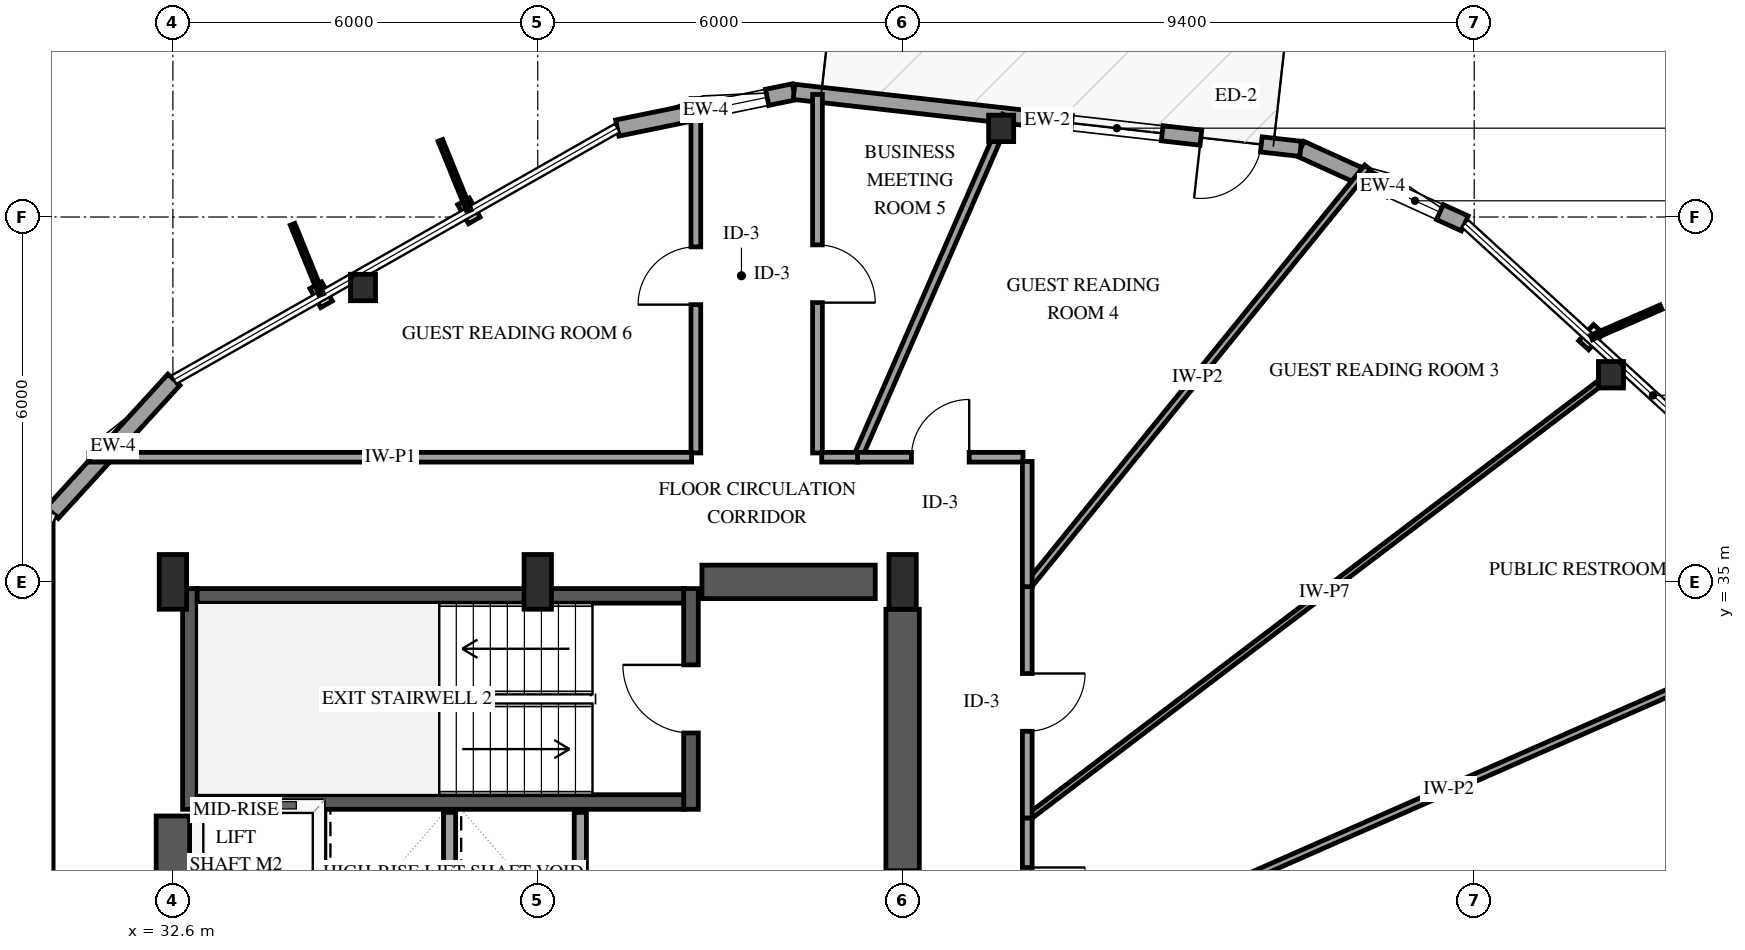
"""IFC4 building model, lengths in metres.
Left out: names, types, materials, properties, quantities, classifications, styles, units other than length and angle.
Written with IfcOpenShell. Run it as: python <this file> out.ifc"""

import sys

from ifc_helpers import new_model, si_unit, direction, frame, frame_2d, origin, origin_2d, place, context, subcontext, project, spatial, rectangle, i_section, extrude, element, fill, save


model = new_model("IFC4")
c1 = context("Model", 3, precision=1e-05, world=origin(), true_north=direction((0.0, 1.0)))
c2 = subcontext(c1, "Body", "Model", "MODEL_VIEW")
j1 = project(units=[si_unit("LENGTHUNIT", "METRE"), si_unit("PLANEANGLEUNIT", "RADIAN")], contexts=[c1])
p1 = place(None, origin())
s1 = spatial("IfcSite", under=j1, at=p1, CompositionType="ELEMENT")
p2 = place(p1, origin())
s2 = spatial("IfcBuilding", under=s1, at=p2, CompositionType="ELEMENT")
p3 = place(p2, frame((0.0, 0.0, 142.6)))
s3 = spatial("IfcBuildingStorey", under=s2, at=p3, CompositionType="ELEMENT", Elevation=142.6)
p4 = place(p3, frame((32.88, 31.26, 0.0), z_axis=(0.0, 0.0, 1.0), x_axis=(0.0, 1.0, 0.0)))
e1 = element("IfcWall", 1, at=p4, inside=s3, PredefinedType="SHEAR", context=c2, shape_type="SweptSolid", body=[
    extrude(rectangle(XDim=3.63, YDim=0.24, at=frame_2d((1.815, 0.0))), origin(), (0.0, 0.0, 1.0), 3.6),
])
p5 = place(p3, frame((41.12, 31.26, 0.0), z_axis=(0.0, 0.0, 1.0), x_axis=(0.0, 1.0, 0.0)))
e2 = element("IfcWall", 2, at=p5, inside=s3, PredefinedType="SHEAR", context=c2, shape_type="SweptSolid", body=[
    extrude(rectangle(XDim=3.63, YDim=0.24, at=frame_2d((1.815, 0.0))), origin(), (0.0, 0.0, 1.0), 3.6),
])
p6 = place(p5, frame((1.255, 0.0, 0.0)))
e3 = element("IfcOpeningElement", 3, at=p6, cuts=e2, PredefinedType="OPENING", context=c2, shape_type="SweptSolid", body=[
    extrude(rectangle(XDim=1.12, YDim=2.15, at=frame_2d((0.56, 1.075))), frame((0.0, 0.13, 0.0), z_axis=(0.0, -1.0, 0.0), x_axis=(1.0, 0.0, 0.0)), (0.0, 0.0, 1.0), 0.26),
])
for number, where, z_axis, x_axis in (
    (4, (33.0, 31.38, 0.0), (0.0, 0.0, 1.0), (1.0, 0.0, 0.0)),
    (5, (33.0, 34.77, 0.0), (0.0, 0.0, 1.0), (1.0, 0.0, 0.0)),
):
    element("IfcWall", number, at=place(p3, frame(where, z_axis=z_axis, x_axis=x_axis)), inside=s3, PredefinedType="SHEAR", context=c2, shape_type="SweptSolid", body=[
        extrude(rectangle(XDim=8.0, YDim=0.24, at=frame_2d((4.0, 0.0))), origin(), (0.0, 0.0, 1.0), 3.6),
    ])
p7 = place(p3, frame((32.6, 18.85, 0.0), z_axis=(0.0, 0.0, 1.0), x_axis=(0.0, 1.0, 0.0)))
e6 = element("IfcWall", 6, at=p7, inside=s3, PredefinedType="SHEAR", context=c2, shape_type="SweptSolid", body=[
    extrude(rectangle(XDim=12.3, YDim=0.55, at=frame_2d((6.15, 0.0))), origin(), (0.0, 0.0, 1.0), 3.6),
])
p8 = place(p3, frame((41.3, 35.0, 0.0), z_axis=(0.0, 0.0, 1.0), x_axis=(1.0, 0.0, 0.0)))
e7 = element("IfcWall", 7, at=p8, inside=s3, PredefinedType="SHEAR", context=c2, shape_type="SweptSolid", body=[
    extrude(rectangle(XDim=2.85, YDim=0.55, at=frame_2d((1.425, 0.0))), origin(), (0.0, 0.0, 1.0), 3.6),
])
p9 = place(p3, frame((44.6, 29.8, 0.0), z_axis=(0.0, 0.0, 1.0), x_axis=(0.0, 1.0, 0.0)))
e8 = element("IfcWall", 8, at=p9, inside=s3, PredefinedType="SHEAR", context=c2, shape_type="SweptSolid", body=[
    extrude(rectangle(XDim=4.75, YDim=0.55, at=frame_2d((2.375, 0.0))), origin(), (0.0, 0.0, 1.0), 3.6),
])
for number, where, z_axis, x_axis in (
    (9, (32.6, 35.0, 0.0), (0.0, 0.0, 1.0), (1.0, 0.0, 0.0)),
    (10, (38.6, 35.0, 0.0), (0.0, 0.0, 1.0), (1.0, 0.0, 0.0)),
    (11, (44.6, 35.0, 0.0), (0.0, 0.0, 1.0), (1.0, 0.0, 0.0)),
):
    element("IfcColumn", number, at=place(p3, frame(where, z_axis=z_axis, x_axis=x_axis)), inside=s3, PredefinedType="PILASTER", context=c2, shape_type="SweptSolid", body=[
        extrude(rectangle(XDim=0.45, YDim=0.9, at=origin_2d()), origin(), (0.0, 0.0, 1.0), 3.6),
    ])
for number, where, z_axis, x_axis in (
    (12, (56.249, 38.406, 0.0), (0.0, 0.0, 1.0), (1.0, 0.0, 0.0)),
    (13, (46.221, 42.458, 0.0), (0.0, 0.0, 1.0), (1.0, 0.0, 0.0)),
    (14, (35.726, 39.841, 0.0), (0.0, 0.0, 1.0), (1.0, 0.0, 0.0)),
):
    element("IfcColumn", number, at=place(p3, frame(where, z_axis=z_axis, x_axis=x_axis)), inside=s3, PredefinedType="COLUMN", context=c2, shape_type="SweptSolid", body=[
        extrude(i_section(OverallWidth=0.412, OverallDepth=0.435, WebThickness=0.036, FlangeThickness=0.057, FilletRadius=0.038, at=origin_2d()), origin(), (0.0, 0.0, 1.0), 3.6),
    ])
p10 = place(p3, frame((53.846, 40.895, 0.0), z_axis=(0.0, 0.0, 1.0), x_axis=(-0.910510169674, 0.413486675625, 0.0)))
e15 = element("IfcWall", 15, at=p10, inside=s3, PredefinedType="SOLIDWALL", context=c2, shape_type="SweptSolid", body=[
    extrude(rectangle(XDim=2.966, YDim=0.27, at=frame_2d((1.483, 0.0))), origin(), (0.0, 0.0, 1.0), 2.679),
])
p11 = place(p10, frame((0.45, 0.0, 0.75)))
e16 = element("IfcOpeningElement", 16, at=p11, cuts=e15, PredefinedType="OPENING", context=c2, shape_type="SweptSolid", body=[
    extrude(rectangle(XDim=0.9, YDim=1.5, at=frame_2d((0.45, 0.75))), frame((0.0, 0.145, 0.0), z_axis=(0.0, -1.0, 0.0), x_axis=(1.0, 0.0, 0.0)), (0.0, 0.0, 1.0), 0.29),
])
p12 = place(p3, frame((42.814, 43.059, 0.0), z_axis=(0.0, 0.0, 1.0), x_axis=(-0.97962927764, -0.200814537297, 0.0)))
e17 = element("IfcWall", 17, at=p12, inside=s3, PredefinedType="SOLIDWALL", context=c2, shape_type="SweptSolid", body=[
    extrude(rectangle(XDim=2.967, YDim=0.27, at=frame_2d((1.483, 0.0))), origin(), (0.0, 0.0, 1.0), 2.679),
])
p13 = place(p12, frame((0.45, 0.0, 0.75)))
e18 = element("IfcOpeningElement", 18, at=p13, cuts=e17, PredefinedType="OPENING", context=c2, shape_type="SweptSolid", body=[
    extrude(rectangle(XDim=0.9, YDim=1.5, at=frame_2d((0.45, 0.75))), frame((0.0, 0.145, 0.0), z_axis=(0.0, -1.0, 0.0), x_axis=(1.0, 0.0, 0.0)), (0.0, 0.0, 1.0), 0.29),
])
p14 = place(p3, frame((51.145, 42.121, 0.0), z_axis=(0.0, 0.0, 1.0), x_axis=(-0.993727918764, 0.111824968001, 0.0)))
e19 = element("IfcWall", 19, at=p14, inside=s3, PredefinedType="SOLIDWALL", context=c2, shape_type="SweptSolid", body=[
    extrude(rectangle(XDim=8.384, YDim=0.25, at=frame_2d((4.192, 0.0))), origin(), (0.0, 0.0, 1.0), 2.679),
])
p15 = place(p14, frame((0.65, 0.0, 0.0)))
e20 = element("IfcOpeningElement", 20, at=p15, cuts=e19, PredefinedType="OPENING", context=c2, shape_type="SweptSolid", body=[
    extrude(rectangle(XDim=1.0, YDim=2.15, at=frame_2d((0.5, 1.075))), frame((0.0, 0.135, 0.0), z_axis=(0.0, -1.0, 0.0), x_axis=(1.0, 0.0, 0.0)), (0.0, 0.0, 1.0), 0.27),
])
p16 = place(p14, frame((2.29, 0.0, 0.72)))
e21 = element("IfcOpeningElement", 21, at=p16, cuts=e19, PredefinedType="OPENING", context=c2, shape_type="SweptSolid", body=[
    extrude(rectangle(XDim=1.5, YDim=1.7, at=frame_2d((0.75, 0.85))), frame((0.0, 0.135, 0.0), z_axis=(0.0, -1.0, 0.0), x_axis=(1.0, 0.0, 0.0)), (0.0, 0.0, 1.0), 0.27),
])
p17 = place(p3, frame((32.617, 38.325, 0.0), z_axis=(0.0, 0.0, 1.0), x_axis=(-0.67449763944, -0.738277003834, 0.0)))
e22 = element("IfcWall", 22, at=p17, inside=s3, PredefinedType="SOLIDWALL", context=c2, shape_type="SweptSolid", body=[
    extrude(rectangle(XDim=2.967, YDim=0.27, at=frame_2d((1.483, 0.0))), origin(), (0.0, 0.0, 1.0), 2.679),
])
for number, where, z_axis, x_axis in (
    (23, (35.0, 29.11, 0.0), (0.0, 0.0, 1.0), (0.0, 1.0, 0.0)),
    (24, (37.15, 29.11, 0.0), (0.0, 0.0, 1.0), (0.0, 1.0, 0.0)),
    (25, (39.3, 29.11, 0.0), (0.0, 0.0, 1.0), (0.0, 1.0, 0.0)),
):
    element("IfcWall", number, at=place(p3, frame(where, z_axis=z_axis, x_axis=x_axis)), inside=s3, PredefinedType="SOLIDWALL", context=c2, shape_type="SweptSolid", body=[
        extrude(rectangle(XDim=2.1, YDim=0.2, at=frame_2d((1.05, 0.0))), origin(), (0.0, 0.0, 1.0), 3.3),
    ])
p18 = place(p3, frame((46.65, 28.541, 0.0), z_axis=(0.0, 0.0, 1.0), x_axis=(0.915393928304, 0.40255925778, 0.0)))
e26 = element("IfcWall", 26, at=p18, inside=s3, PredefinedType="PARTITIONING", context=c2, shape_type="SweptSolid", body=[
    extrude(rectangle(XDim=15.146, YDim=0.12, at=frame_2d((7.573, 0.0))), origin(), (0.0, 0.0, 1.0), 3.3),
])
p19 = place(p3, frame((30.55, 21.778, 0.0), z_axis=(0.0, 0.0, 1.0), x_axis=(0.0, 1.0, 0.0)))
e27 = element("IfcWall", 27, at=p19, inside=s3, PredefinedType="PARTITIONING", context=c2, shape_type="SweptSolid", body=[
    extrude(rectangle(XDim=14.212, YDim=0.16, at=frame_2d((7.106, 0.0))), origin(), (0.0, 0.0, 1.0), 3.3),
])
p20 = place(p19, frame((6.631, 0.0, 0.0)))
e28 = element("IfcOpeningElement", 28, at=p20, cuts=e27, PredefinedType="OPENING", context=c2, shape_type="SweptSolid", body=[
    extrude(rectangle(XDim=0.95, YDim=2.15, at=frame_2d((0.475, 1.075))), frame((0.0, 0.09, 0.0), z_axis=(0.0, -1.0, 0.0), x_axis=(1.0, 0.0, 0.0)), (0.0, 0.0, 1.0), 0.18),
])
p21 = place(p3, frame((46.65, 31.115, 0.0), z_axis=(0.0, 0.0, 1.0), x_axis=(0.796330811918, 0.60486133782, 0.0)))
e29 = element("IfcWall", 29, at=p21, inside=s3, PredefinedType="PARTITIONING", context=c2, shape_type="SweptSolid", body=[
    extrude(rectangle(XDim=12.274, YDim=0.1, at=frame_2d((6.137, 0.0))), origin(), (0.0, 0.0, 1.0), 3.3),
])
p22 = place(p3, frame((46.65, 34.921, 0.0), z_axis=(0.0, 0.0, 1.0), x_axis=(0.630130936526, 0.776488894211, 0.0)))
e30 = element("IfcWall", 30, at=p22, inside=s3, PredefinedType="PARTITIONING", context=c2, shape_type="SweptSolid", body=[
    extrude(rectangle(XDim=8.881, YDim=0.12, at=frame_2d((4.44, 0.0))), origin(), (0.0, 0.0, 1.0), 2.678),
])
p23 = place(p3, frame((43.86, 37.05, 0.0), z_axis=(0.0, 0.0, 1.0), x_axis=(0.400047313653, 0.916494488166, 0.0)))
e31 = element("IfcWall", 31, at=p23, inside=s3, PredefinedType="PARTITIONING", context=c2, shape_type="SweptSolid", body=[
    extrude(rectangle(XDim=6.127, YDim=0.14, at=frame_2d((3.063, 0.0))), origin(), (0.0, 0.0, 1.0), 2.595),
])
p24 = place(p3, frame((43.2, 43.015, 0.0), z_axis=(0.0, 0.0, 1.0), x_axis=(0.0, -1.0, 0.0)))
e32 = element("IfcWall", 32, at=p24, inside=s3, PredefinedType="PARTITIONING", context=c2, shape_type="SweptSolid", body=[
    extrude(rectangle(XDim=5.895, YDim=0.16, at=frame_2d((2.947, 0.0))), origin(), (0.0, 0.0, 1.0), 3.3),
])
p25 = place(p24, frame((2.473, 0.0, 0.0)))
e33 = element("IfcOpeningElement", 33, at=p25, cuts=e32, PredefinedType="OPENING", context=c2, shape_type="SweptSolid", body=[
    extrude(rectangle(XDim=0.95, YDim=2.15, at=frame_2d((0.475, 1.075))), frame((0.0, 0.09, 0.0), z_axis=(0.0, -1.0, 0.0), x_axis=(1.0, 0.0, 0.0)), (0.0, 0.0, 1.0), 0.18),
])
p26 = place(p3, frame((41.2, 37.12, 0.0), z_axis=(0.0, 0.0, 1.0), x_axis=(0.0, 1.0, 0.0)))
e34 = element("IfcWall", 34, at=p26, inside=s3, PredefinedType="PARTITIONING", context=c2, shape_type="SweptSolid", body=[
    extrude(rectangle(XDim=5.828, YDim=0.16, at=frame_2d((2.914, 0.0))), origin(), (0.0, 0.0, 1.0), 2.678),
])
p27 = place(p26, frame((2.439, 0.0, 0.0)))
e35 = element("IfcOpeningElement", 35, at=p27, cuts=e34, PredefinedType="OPENING", context=c2, shape_type="SweptSolid", body=[
    extrude(rectangle(XDim=0.95, YDim=2.15, at=frame_2d((0.475, 1.075))), frame((0.0, 0.09, 0.0), z_axis=(0.0, -1.0, 0.0), x_axis=(1.0, 0.0, 0.0)), (0.0, 0.0, 1.0), 0.18),
])
p28 = place(p3, frame((31.22, 37.05, 0.0), z_axis=(0.0, 0.0, 1.0), x_axis=(1.0, 0.0, 0.0)))
e36 = element("IfcWall", 36, at=p28, inside=s3, PredefinedType="PARTITIONING", context=c2, shape_type="SweptSolid", body=[
    extrude(rectangle(XDim=5.047, YDim=0.16, at=frame_2d((2.523, 0.0))), origin(), (0.0, 0.0, 1.0), 3.3),
])
p29 = place(p3, frame((36.268, 37.05, 0.0), z_axis=(0.0, 0.0, 1.0), x_axis=(1.0, 0.0, 0.0)))
e37 = element("IfcWall", 37, at=p29, inside=s3, PredefinedType="PARTITIONING", context=c2, shape_type="SweptSolid", body=[
    extrude(rectangle(XDim=4.862, YDim=0.16, at=frame_2d((2.431, 0.0))), origin(), (0.0, 0.0, 1.0), 3.3),
])
p30 = place(p3, frame((46.65, 34.921, 0.0), z_axis=(0.0, 0.0, 1.0), x_axis=(0.0, -1.0, 0.0)))
e38 = element("IfcWall", 38, at=p30, inside=s3, PredefinedType="PARTITIONING", context=c2, shape_type="SweptSolid", body=[
    extrude(rectangle(XDim=3.806, YDim=0.16, at=frame_2d((1.903, 0.0))), origin(), (0.0, 0.0, 1.0), 3.3),
])
p31 = place(p30, frame((1.428, 0.0, 0.0)))
e39 = element("IfcOpeningElement", 39, at=p31, cuts=e38, PredefinedType="OPENING", context=c2, shape_type="SweptSolid", body=[
    extrude(rectangle(XDim=0.95, YDim=2.15, at=frame_2d((0.475, 1.075))), frame((0.0, 0.09, 0.0), z_axis=(0.0, -1.0, 0.0), x_axis=(1.0, 0.0, 0.0)), (0.0, 0.0, 1.0), 0.18),
])
p32 = place(p3, frame((43.86, 37.05, 0.0), z_axis=(0.0, 0.0, 1.0), x_axis=(1.0, 0.0, 0.0)))
e40 = element("IfcWall", 40, at=p32, inside=s3, PredefinedType="PARTITIONING", context=c2, shape_type="SweptSolid", body=[
    extrude(rectangle(XDim=2.72, YDim=0.16, at=frame_2d((1.36, 0.0))), origin(), (0.0, 0.0, 1.0), 3.3),
])
p33 = place(p32, frame((0.885, 0.0, 0.0)))
e41 = element("IfcOpeningElement", 41, at=p33, cuts=e40, PredefinedType="OPENING", context=c2, shape_type="SweptSolid", body=[
    extrude(rectangle(XDim=0.95, YDim=2.15, at=frame_2d((0.475, 1.075))), frame((0.0, 0.09, 0.0), z_axis=(0.0, -1.0, 0.0), x_axis=(1.0, 0.0, 0.0)), (0.0, 0.0, 1.0), 0.18),
])
p34 = place(p3, frame((46.65, 31.115, 0.0), z_axis=(0.0, 0.0, 1.0), x_axis=(0.0, -1.0, 0.0)))
e42 = element("IfcWall", 42, at=p34, inside=s3, PredefinedType="PARTITIONING", context=c2, shape_type="SweptSolid", body=[
    extrude(rectangle(XDim=2.574, YDim=0.16, at=frame_2d((1.287, 0.0))), origin(), (0.0, 0.0, 1.0), 3.3),
])
p35 = place(p34, frame((0.812, 0.0, 0.0)))
e43 = element("IfcOpeningElement", 43, at=p35, cuts=e42, PredefinedType="OPENING", context=c2, shape_type="SweptSolid", body=[
    extrude(rectangle(XDim=0.95, YDim=2.15, at=frame_2d((0.475, 1.075))), frame((0.0, 0.09, 0.0), z_axis=(0.0, -1.0, 0.0), x_axis=(1.0, 0.0, 0.0)), (0.0, 0.0, 1.0), 0.18),
])
p36 = place(p3, frame((46.65, 36.98, 0.0), z_axis=(0.0, 0.0, 1.0), x_axis=(0.0, -1.0, 0.0)))
e44 = element("IfcWall", 44, at=p36, inside=s3, PredefinedType="PARTITIONING", context=c2, shape_type="SweptSolid", body=[
    extrude(rectangle(XDim=2.059, YDim=0.16, at=frame_2d((1.03, 0.0))), origin(), (0.0, 0.0, 1.0), 3.3),
])
p37 = place(p3, frame((43.27, 37.05, 0.0), z_axis=(0.0, 0.0, 1.0), x_axis=(1.0, 0.0, 0.0)))
e45 = element("IfcWall", 45, at=p37, inside=s3, PredefinedType="PARTITIONING", context=c2, shape_type="SweptSolid", body=[
    extrude(rectangle(XDim=0.59, YDim=0.16, at=frame_2d((0.295, 0.0))), origin(), (0.0, 0.0, 1.0), 3.3),
])
p38 = place(p11, origin())
e46 = element("IfcWindow", 46, at=p38, inside=s3, PartitioningType="SINGLE_PANEL", PredefinedType="WINDOW", context=c2, shape_type="SweptSolid", body=[
    extrude(rectangle(XDim=0.9, YDim=1.5, at=frame_2d((0.45, 0.75))), frame((0.0, 0.03, 0.0), z_axis=(0.0, -1.0, 0.0), x_axis=(1.0, 0.0, 0.0)), (0.0, 0.0, 1.0), 0.06),
])
fill(e16, e46)
p39 = place(p13, origin())
e47 = element("IfcWindow", 47, at=p39, inside=s3, PartitioningType="SINGLE_PANEL", PredefinedType="WINDOW", context=c2, shape_type="SweptSolid", body=[
    extrude(rectangle(XDim=0.9, YDim=1.5, at=frame_2d((0.45, 0.75))), frame((0.0, 0.03, 0.0), z_axis=(0.0, -1.0, 0.0), x_axis=(1.0, 0.0, 0.0)), (0.0, 0.0, 1.0), 0.06),
])
fill(e18, e47)
p40 = place(p15, origin())
e48 = element("IfcDoor", 48, at=p40, inside=s3, OperationType="SINGLE_SWING_RIGHT", PredefinedType="DOOR", context=c2, shape_type="SweptSolid", body=[
    extrude(rectangle(XDim=1.0, YDim=2.15, at=frame_2d((0.5, 1.075))), frame((0.0, 0.025, 0.0), z_axis=(0.0, -1.0, 0.0), x_axis=(1.0, 0.0, 0.0)), (0.0, 0.0, 1.0), 0.05),
])
fill(e20, e48)
p41 = place(p16, origin())
e49 = element("IfcWindow", 49, at=p41, inside=s3, PartitioningType="SINGLE_PANEL", PredefinedType="WINDOW", context=c2, shape_type="SweptSolid", body=[
    extrude(rectangle(XDim=1.5, YDim=1.7, at=frame_2d((0.75, 0.85))), frame((0.0, 0.03, 0.0), z_axis=(0.0, -1.0, 0.0), x_axis=(1.0, 0.0, 0.0)), (0.0, 0.0, 1.0), 0.06),
])
fill(e21, e49)
p42 = place(p6, origin())
e50 = element("IfcDoor", 50, at=p42, inside=s3, OperationType="SINGLE_SWING_RIGHT", PredefinedType="DOOR", context=c2, shape_type="SweptSolid", body=[
    extrude(rectangle(XDim=1.12, YDim=2.15, at=frame_2d((0.56, 1.075))), frame((0.0, 0.025, 0.0), z_axis=(0.0, -1.0, 0.0), x_axis=(1.0, 0.0, 0.0)), (0.0, 0.0, 1.0), 0.05),
])
fill(e3, e50)
p43 = place(p25, origin())
e51 = element("IfcDoor", 51, at=p43, inside=s3, OperationType="SINGLE_SWING_RIGHT", PredefinedType="DOOR", context=c2, shape_type="SweptSolid", body=[
    extrude(rectangle(XDim=0.95, YDim=2.15, at=frame_2d((0.475, 1.075))), frame((0.0, 0.025, 0.0), z_axis=(0.0, -1.0, 0.0), x_axis=(1.0, 0.0, 0.0)), (0.0, 0.0, 1.0), 0.05),
])
fill(e33, e51)
p44 = place(p27, origin())
e52 = element("IfcDoor", 52, at=p44, inside=s3, OperationType="SINGLE_SWING_LEFT", PredefinedType="DOOR", context=c2, shape_type="SweptSolid", body=[
    extrude(rectangle(XDim=0.95, YDim=2.15, at=frame_2d((0.475, 1.075))), frame((0.0, 0.025, 0.0), z_axis=(0.0, -1.0, 0.0), x_axis=(1.0, 0.0, 0.0)), (0.0, 0.0, 1.0), 0.05),
])
fill(e35, e52)
p45 = place(p31, origin())
e53 = element("IfcDoor", 53, at=p45, inside=s3, OperationType="SINGLE_SWING_LEFT", PredefinedType="DOOR", context=c2, shape_type="SweptSolid", body=[
    extrude(rectangle(XDim=0.95, YDim=2.15, at=frame_2d((0.475, 1.075))), frame((0.0, 0.025, 0.0), z_axis=(0.0, -1.0, 0.0), x_axis=(1.0, 0.0, 0.0)), (0.0, 0.0, 1.0), 0.05),
])
fill(e39, e53)
p46 = place(p33, origin())
e54 = element("IfcDoor", 54, at=p46, inside=s3, OperationType="SINGLE_SWING_RIGHT", PredefinedType="DOOR", context=c2, shape_type="SweptSolid", body=[
    extrude(rectangle(XDim=0.95, YDim=2.15, at=frame_2d((0.475, 1.075))), frame((0.0, 0.025, 0.0), z_axis=(0.0, -1.0, 0.0), x_axis=(1.0, 0.0, 0.0)), (0.0, 0.0, 1.0), 0.05),
])
fill(e41, e54)
p47 = place(p35, origin())
e55 = element("IfcDoor", 55, at=p47, inside=s3, OperationType="SINGLE_SWING_LEFT", PredefinedType="DOOR", context=c2, shape_type="SweptSolid", body=[
    extrude(rectangle(XDim=0.95, YDim=2.15, at=frame_2d((0.475, 1.075))), frame((0.0, 0.025, 0.0), z_axis=(0.0, -1.0, 0.0), x_axis=(1.0, 0.0, 0.0)), (0.0, 0.0, 1.0), 0.05),
])
fill(e43, e55)
save(model, sys.argv[1])
